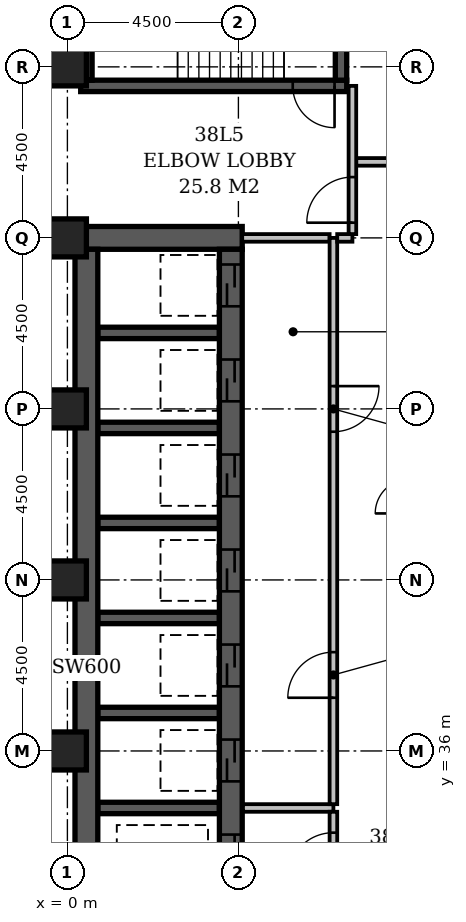
"""IFC4 building model, lengths in metres.
Left out: names, types, materials, properties, quantities, classifications, styles, units other than length and angle.
Written with IfcOpenShell. Run it as: python <this file> out.ifc"""

import sys

from ifc_helpers import new_model, si_unit, direction, frame, frame_2d, origin, origin_2d, place, context, subcontext, project, spatial, rectangle, extrude, element, fill, save


model = new_model("IFC4")
c1 = context("Model", 3, precision=1e-05, world=origin(), true_north=direction((0.0, 1.0)))
c2 = subcontext(c1, "Body", "Model", "MODEL_VIEW")
j1 = project(units=[si_unit("LENGTHUNIT", "METRE"), si_unit("PLANEANGLEUNIT", "RADIAN")], contexts=[c1])
p1 = place(None, origin())
s1 = spatial("IfcSite", under=j1, at=p1, CompositionType="ELEMENT")
p2 = place(p1, origin())
s2 = spatial("IfcBuilding", under=s1, at=p2, CompositionType="ELEMENT")
p3 = place(p2, frame((0.0, 0.0, 152.0)))
s3 = spatial("IfcBuildingStorey", under=s2, at=p3, CompositionType="ELEMENT", Elevation=152.0)
p4 = place(p3, frame((0.2, 49.5, -0.3), z_axis=(0.0, 0.0, 1.0), x_axis=(1.0, 0.0, 0.0)))
e1 = element("IfcWall", 1, at=p4, inside=s3, PredefinedType="SHEAR", context=c2, shape_type="SweptSolid", body=[
    extrude(rectangle(XDim=4.4, YDim=0.6, at=frame_2d((2.2, 0.0))), origin(), (0.0, 0.0, 1.0), 3.6),
])
p5 = place(p3, frame((0.35, 53.5, -0.3), z_axis=(0.0, 0.0, 1.0), x_axis=(1.0, 0.0, 0.0)))
e2 = element("IfcWall", 2, at=p5, inside=s3, PredefinedType="SHEAR", context=c2, shape_type="SweptSolid", body=[
    extrude(rectangle(XDim=7.0, YDim=0.3, at=frame_2d((3.5, 0.0))), origin(), (0.0, 0.0, 1.0), 3.6),
])
p6 = place(p5, frame((5.58, 0.0, 0.3)))
e3 = element("IfcOpeningElement", 3, at=p6, cuts=e2, PredefinedType="OPENING", context=c2, shape_type="SweptSolid", body=[
    extrude(rectangle(XDim=1.1, YDim=2.1, at=frame_2d((0.55, 1.05))), frame((0.0, 0.162, 0.0), z_axis=(0.0, -1.0, 0.0), x_axis=(1.0, 0.0, 0.0)), (0.0, 0.0, 1.0), 0.324),
])
p7 = place(p3, frame((0.5, 27.15, -0.3), z_axis=(0.0, 0.0, 1.0), x_axis=(0.0, 1.0, 0.0)))
e4 = element("IfcWall", 4, at=p7, inside=s3, PredefinedType="SHEAR", context=c2, shape_type="SweptSolid", body=[
    extrude(rectangle(XDim=22.05, YDim=0.6, at=frame_2d((11.025, 0.0))), origin(), (0.0, 0.0, 1.0), 3.6),
])
p8 = place(p3, frame((0.5, 53.65, -0.3), z_axis=(0.0, 0.0, 1.0), x_axis=(0.0, 1.0, 0.0)))
e5 = element("IfcWall", 5, at=p8, inside=s3, PredefinedType="SHEAR", context=c2, shape_type="SweptSolid", body=[
    extrude(rectangle(XDim=4.2, YDim=0.3, at=frame_2d((2.1, 0.0))), origin(), (0.0, 0.0, 1.0), 3.6),
])
for number, where, z_axis, x_axis in (
    (6, (0.8, 34.5, -0.3), (0.0, 0.0, 1.0), (1.0, 0.0, 0.0)),
    (7, (0.8, 37.0, -0.3), (0.0, 0.0, 1.0), (1.0, 0.0, 0.0)),
    (8, (0.8, 39.5, -0.3), (0.0, 0.0, 1.0), (1.0, 0.0, 0.0)),
    (9, (0.8, 42.0, -0.3), (0.0, 0.0, 1.0), (1.0, 0.0, 0.0)),
    (10, (0.8, 44.5, -0.3), (0.0, 0.0, 1.0), (1.0, 0.0, 0.0)),
    (11, (0.8, 47.0, -0.3), (0.0, 0.0, 1.0), (1.0, 0.0, 0.0)),
):
    element("IfcWall", number, at=place(p3, frame(where, z_axis=z_axis, x_axis=x_axis)), inside=s3, PredefinedType="SHEAR", context=c2, shape_type="SweptSolid", body=[
        extrude(rectangle(XDim=3.2, YDim=0.3, at=frame_2d((1.6, 0.0))), origin(), (0.0, 0.0, 1.0), 3.6),
    ])
p9 = place(p3, frame((4.3, 27.15, -0.3), z_axis=(0.0, 0.0, 1.0), x_axis=(0.0, 1.0, 0.0)))
e12 = element("IfcWall", 12, at=p9, inside=s3, PredefinedType="SHEAR", context=c2, shape_type="SweptSolid", body=[
    extrude(rectangle(XDim=22.05, YDim=0.6, at=frame_2d((11.025, 0.0))), origin(), (0.0, 0.0, 1.0), 3.6),
])
p10 = place(p9, frame((3.05, 0.0, 0.3)))
e13 = element("IfcOpeningElement", 13, at=p10, cuts=e12, PredefinedType="OPENING", context=c2, shape_type="SweptSolid", body=[
    extrude(rectangle(XDim=1.1, YDim=2.1, at=frame_2d((0.55, 1.05))), frame((0.0, 0.312, 0.0), z_axis=(0.0, -1.0, 0.0), x_axis=(1.0, 0.0, 0.0)), (0.0, 0.0, 1.0), 0.624),
])
p11 = place(p9, frame((0.55, 0.0, 0.3)))
e14 = element("IfcOpeningElement", 14, at=p11, cuts=e12, PredefinedType="OPENING", context=c2, shape_type="SweptSolid", body=[
    extrude(rectangle(XDim=1.1, YDim=2.1, at=frame_2d((0.55, 1.05))), frame((0.0, 0.312, 0.0), z_axis=(0.0, -1.0, 0.0), x_axis=(1.0, 0.0, 0.0)), (0.0, 0.0, 1.0), 0.624),
])
p12 = place(p9, frame((20.55, 0.0, 0.3)))
e15 = element("IfcOpeningElement", 15, at=p12, cuts=e12, PredefinedType="OPENING", context=c2, shape_type="SweptSolid", body=[
    extrude(rectangle(XDim=1.1, YDim=2.1, at=frame_2d((0.55, 1.05))), frame((0.0, 0.312, 0.0), z_axis=(0.0, -1.0, 0.0), x_axis=(1.0, 0.0, 0.0)), (0.0, 0.0, 1.0), 0.624),
])
p13 = place(p9, frame((18.05, 0.0, 0.3)))
e16 = element("IfcOpeningElement", 16, at=p13, cuts=e12, PredefinedType="OPENING", context=c2, shape_type="SweptSolid", body=[
    extrude(rectangle(XDim=1.1, YDim=2.1, at=frame_2d((0.55, 1.05))), frame((0.0, 0.312, 0.0), z_axis=(0.0, -1.0, 0.0), x_axis=(1.0, 0.0, 0.0)), (0.0, 0.0, 1.0), 0.624),
])
p14 = place(p9, frame((15.55, 0.0, 0.3)))
e17 = element("IfcOpeningElement", 17, at=p14, cuts=e12, PredefinedType="OPENING", context=c2, shape_type="SweptSolid", body=[
    extrude(rectangle(XDim=1.1, YDim=2.1, at=frame_2d((0.55, 1.05))), frame((0.0, 0.312, 0.0), z_axis=(0.0, -1.0, 0.0), x_axis=(1.0, 0.0, 0.0)), (0.0, 0.0, 1.0), 0.624),
])
p15 = place(p9, frame((13.05, 0.0, 0.3)))
e18 = element("IfcOpeningElement", 18, at=p15, cuts=e12, PredefinedType="OPENING", context=c2, shape_type="SweptSolid", body=[
    extrude(rectangle(XDim=1.1, YDim=2.1, at=frame_2d((0.55, 1.05))), frame((0.0, 0.312, 0.0), z_axis=(0.0, -1.0, 0.0), x_axis=(1.0, 0.0, 0.0)), (0.0, 0.0, 1.0), 0.624),
])
p16 = place(p9, frame((10.55, 0.0, 0.3)))
e19 = element("IfcOpeningElement", 19, at=p16, cuts=e12, PredefinedType="OPENING", context=c2, shape_type="SweptSolid", body=[
    extrude(rectangle(XDim=1.1, YDim=2.1, at=frame_2d((0.55, 1.05))), frame((0.0, 0.312, 0.0), z_axis=(0.0, -1.0, 0.0), x_axis=(1.0, 0.0, 0.0)), (0.0, 0.0, 1.0), 0.624),
])
p17 = place(p9, frame((8.05, 0.0, 0.3)))
e20 = element("IfcOpeningElement", 20, at=p17, cuts=e12, PredefinedType="OPENING", context=c2, shape_type="SweptSolid", body=[
    extrude(rectangle(XDim=1.1, YDim=2.1, at=frame_2d((0.55, 1.05))), frame((0.0, 0.312, 0.0), z_axis=(0.0, -1.0, 0.0), x_axis=(1.0, 0.0, 0.0)), (0.0, 0.0, 1.0), 0.624),
])
p18 = place(p9, frame((5.55, 0.0, 0.3)))
e21 = element("IfcOpeningElement", 21, at=p18, cuts=e12, PredefinedType="OPENING", context=c2, shape_type="SweptSolid", body=[
    extrude(rectangle(XDim=1.1, YDim=2.1, at=frame_2d((0.55, 1.05))), frame((0.0, 0.312, 0.0), z_axis=(0.0, -1.0, 0.0), x_axis=(1.0, 0.0, 0.0)), (0.0, 0.0, 1.0), 0.624),
])
p19 = place(p3, frame((7.2, 53.65, -0.3), z_axis=(0.0, 0.0, 1.0), x_axis=(0.0, 1.0, 0.0)))
e22 = element("IfcWall", 22, at=p19, inside=s3, PredefinedType="SHEAR", context=c2, shape_type="SweptSolid", body=[
    extrude(rectangle(XDim=4.2, YDim=0.3, at=frame_2d((2.1, 0.0))), origin(), (0.0, 0.0, 1.0), 3.6),
])
for number, where, z_axis, x_axis in (
    (23, (0.0, 36.0, -0.3), (0.0, 0.0, 1.0), (1.0, 0.0, 0.0)),
    (24, (0.0, 40.5, -0.3), (0.0, 0.0, 1.0), (1.0, 0.0, 0.0)),
    (25, (0.0, 45.0, -0.3), (0.0, 0.0, 1.0), (1.0, 0.0, 0.0)),
    (26, (0.0, 49.5, -0.3), (0.0, 0.0, 1.0), (1.0, 0.0, 0.0)),
    (27, (0.0, 54.0, -0.3), (0.0, 0.0, 1.0), (1.0, 0.0, 0.0)),
):
    element("IfcColumn", number, at=place(p3, frame(where, z_axis=z_axis, x_axis=x_axis)), inside=s3, PredefinedType="COLUMN", context=c2, shape_type="SweptSolid", body=[
        extrude(rectangle(XDim=1.0, YDim=1.0, at=origin_2d()), origin(), (0.0, 0.0, 1.0), 3.6),
    ])
p20 = place(p3, frame((4.62, 34.5, 0.0), z_axis=(0.0, 0.0, 1.0), x_axis=(1.0, 0.0, 0.0)))
e28 = element("IfcWall", 28, at=p20, inside=s3, PredefinedType="PARTITIONING", context=c2, shape_type="SweptSolid", body=[
    extrude(rectangle(XDim=2.38, YDim=0.2, at=frame_2d((1.19, 0.0))), origin(), (0.0, 0.0, 1.0), 3.3),
])
p21 = place(p3, frame((7.0, 34.6, 0.0), z_axis=(0.0, 0.0, 1.0), x_axis=(0.0, 1.0, 0.0)))
e29 = element("IfcWall", 29, at=p21, inside=s3, PredefinedType="PARTITIONING", context=c2, shape_type="SweptSolid", body=[
    extrude(rectangle(XDim=14.9, YDim=0.2, at=frame_2d((7.45, 0.0))), origin(), (0.0, 0.0, 1.0), 3.3),
])
p22 = place(p21, frame((2.8, 0.0, 0.0)))
e30 = element("IfcOpeningElement", 30, at=p22, cuts=e29, PredefinedType="OPENING", context=c2, shape_type="SweptSolid", body=[
    extrude(rectangle(XDim=1.2, YDim=2.1, at=frame_2d((0.6, 1.05))), frame((0.0, 0.112, 0.0), z_axis=(0.0, -1.0, 0.0), x_axis=(1.0, 0.0, 0.0)), (0.0, 0.0, 1.0), 0.224),
])
p23 = place(p21, frame((9.8, 0.0, 0.0)))
e31 = element("IfcOpeningElement", 31, at=p23, cuts=e29, PredefinedType="OPENING", context=c2, shape_type="SweptSolid", body=[
    extrude(rectangle(XDim=1.2, YDim=2.1, at=frame_2d((0.6, 1.05))), frame((0.0, 0.112, 0.0), z_axis=(0.0, -1.0, 0.0), x_axis=(1.0, 0.0, 0.0)), (0.0, 0.0, 1.0), 0.224),
])
p24 = place(p3, frame((4.6, 49.5, 0.0), z_axis=(0.0, 0.0, 1.0), x_axis=(1.0, 0.0, 0.0)))
e32 = element("IfcWall", 32, at=p24, inside=s3, PredefinedType="PARTITIONING", context=c2, shape_type="SweptSolid", body=[
    extrude(rectangle(XDim=2.3, YDim=0.2, at=frame_2d((1.15, 0.0))), origin(), (0.0, 0.0, 1.0), 3.3),
])
p25 = place(p3, frame((7.0, 32.1, 0.0), z_axis=(0.0, 0.0, 1.0), x_axis=(0.0, 1.0, 0.0)))
e33 = element("IfcWall", 33, at=p25, inside=s3, PredefinedType="PARTITIONING", context=c2, shape_type="SweptSolid", body=[
    extrude(rectangle(XDim=2.3, YDim=0.2, at=frame_2d((1.15, 0.0))), origin(), (0.0, 0.0, 1.0), 3.3),
])
p26 = place(p25, frame((0.55, 0.0, 0.0)))
e34 = element("IfcOpeningElement", 34, at=p26, cuts=e33, PredefinedType="OPENING", context=c2, shape_type="SweptSolid", body=[
    extrude(rectangle(XDim=1.2, YDim=2.1, at=frame_2d((0.6, 1.05))), frame((0.0, 0.112, 0.0), z_axis=(0.0, -1.0, 0.0), x_axis=(1.0, 0.0, 0.0)), (0.0, 0.0, 1.0), 0.224),
])
p27 = place(p3, frame((7.1, 49.5, 0.0), z_axis=(0.0, 0.0, 1.0), x_axis=(1.0, 0.0, 0.0)))
e35 = element("IfcWall", 35, at=p27, inside=s3, PredefinedType="PARTITIONING", context=c2, shape_type="SweptSolid", body=[
    extrude(rectangle(XDim=0.4, YDim=0.2, at=frame_2d((0.2, 0.0))), origin(), (0.0, 0.0, 1.0), 3.3),
])
p28 = place(p3, frame((7.5, 49.6, 0.0), z_axis=(0.0, 0.0, 1.0), x_axis=(0.0, 1.0, 0.0)))
e36 = element("IfcWall", 36, at=p28, inside=s3, PredefinedType="PARTITIONING", context=c2, shape_type="SweptSolid", body=[
    extrude(rectangle(XDim=3.9, YDim=0.2, at=frame_2d((1.95, 0.0))), origin(), (0.0, 0.0, 1.0), 3.3),
])
p29 = place(p28, frame((0.3, 0.0, 0.0)))
e37 = element("IfcOpeningElement", 37, at=p29, cuts=e36, PredefinedType="OPENING", context=c2, shape_type="SweptSolid", body=[
    extrude(rectangle(XDim=1.2, YDim=2.1, at=frame_2d((0.6, 1.05))), frame((0.0, 0.112, 0.0), z_axis=(0.0, -1.0, 0.0), x_axis=(1.0, 0.0, 0.0)), (0.0, 0.0, 1.0), 0.224),
])
p30 = place(p3, frame((7.6, 51.5, 0.0), z_axis=(0.0, 0.0, 1.0), x_axis=(1.0, 0.0, 0.0)))
e38 = element("IfcWall", 38, at=p30, inside=s3, PredefinedType="PARTITIONING", context=c2, shape_type="SweptSolid", body=[
    extrude(rectangle(XDim=15.3, YDim=0.2, at=frame_2d((7.65, 0.0))), origin(), (0.0, 0.0, 1.0), 3.3),
])
p31 = place(p30, frame((3.55, 0.0, 0.0)))
e39 = element("IfcOpeningElement", 39, at=p31, cuts=e38, PredefinedType="OPENING", context=c2, shape_type="SweptSolid", body=[
    extrude(rectangle(XDim=0.9, YDim=2.1, at=frame_2d((0.45, 1.05))), frame((0.0, 0.112, 0.0), z_axis=(0.0, -1.0, 0.0), x_axis=(1.0, 0.0, 0.0)), (0.0, 0.0, 1.0), 0.224),
])
p32 = place(p30, frame((11.3, 0.0, 0.0)))
e40 = element("IfcOpeningElement", 40, at=p32, cuts=e38, PredefinedType="OPENING", context=c2, shape_type="SweptSolid", body=[
    extrude(rectangle(XDim=0.9, YDim=2.1, at=frame_2d((0.45, 1.05))), frame((0.0, 0.112, 0.0), z_axis=(0.0, -1.0, 0.0), x_axis=(1.0, 0.0, 0.0)), (0.0, 0.0, 1.0), 0.224),
])
p33 = place(p29, origin())
e41 = element("IfcDoor", 41, at=p33, inside=s3, OperationType="SINGLE_SWING_LEFT", PredefinedType="DOOR", context=c2, shape_type="SweptSolid", body=[
    extrude(rectangle(XDim=1.2, YDim=2.1, at=frame_2d((0.6, 1.05))), frame((0.0, 0.025, 0.0), z_axis=(0.0, -1.0, 0.0), x_axis=(1.0, 0.0, 0.0)), (0.0, 0.0, 1.0), 0.05),
])
fill(e37, e41)
p34 = place(p12, origin())
e42 = element("IfcDoor", 42, at=p34, inside=s3, OperationType="SLIDING_TO_LEFT", PredefinedType="DOOR", context=c2, shape_type="SweptSolid", body=[
    extrude(rectangle(XDim=1.1, YDim=2.1, at=frame_2d((0.55, 1.05))), frame((0.0, 0.025, 0.0), z_axis=(0.0, -1.0, 0.0), x_axis=(1.0, 0.0, 0.0)), (0.0, 0.0, 1.0), 0.05),
])
fill(e15, e42)
p35 = place(p13, origin())
e43 = element("IfcDoor", 43, at=p35, inside=s3, OperationType="SLIDING_TO_LEFT", PredefinedType="DOOR", context=c2, shape_type="SweptSolid", body=[
    extrude(rectangle(XDim=1.1, YDim=2.1, at=frame_2d((0.55, 1.05))), frame((0.0, 0.025, 0.0), z_axis=(0.0, -1.0, 0.0), x_axis=(1.0, 0.0, 0.0)), (0.0, 0.0, 1.0), 0.05),
])
fill(e16, e43)
p36 = place(p14, origin())
e44 = element("IfcDoor", 44, at=p36, inside=s3, OperationType="SLIDING_TO_LEFT", PredefinedType="DOOR", context=c2, shape_type="SweptSolid", body=[
    extrude(rectangle(XDim=1.1, YDim=2.1, at=frame_2d((0.55, 1.05))), frame((0.0, 0.025, 0.0), z_axis=(0.0, -1.0, 0.0), x_axis=(1.0, 0.0, 0.0)), (0.0, 0.0, 1.0), 0.05),
])
fill(e17, e44)
p37 = place(p15, origin())
e45 = element("IfcDoor", 45, at=p37, inside=s3, OperationType="SLIDING_TO_LEFT", PredefinedType="DOOR", context=c2, shape_type="SweptSolid", body=[
    extrude(rectangle(XDim=1.1, YDim=2.1, at=frame_2d((0.55, 1.05))), frame((0.0, 0.025, 0.0), z_axis=(0.0, -1.0, 0.0), x_axis=(1.0, 0.0, 0.0)), (0.0, 0.0, 1.0), 0.05),
])
fill(e18, e45)
p38 = place(p16, origin())
e46 = element("IfcDoor", 46, at=p38, inside=s3, OperationType="SLIDING_TO_LEFT", PredefinedType="DOOR", context=c2, shape_type="SweptSolid", body=[
    extrude(rectangle(XDim=1.1, YDim=2.1, at=frame_2d((0.55, 1.05))), frame((0.0, 0.025, 0.0), z_axis=(0.0, -1.0, 0.0), x_axis=(1.0, 0.0, 0.0)), (0.0, 0.0, 1.0), 0.05),
])
fill(e19, e46)
p39 = place(p17, origin())
e47 = element("IfcDoor", 47, at=p39, inside=s3, OperationType="SLIDING_TO_LEFT", PredefinedType="DOOR", context=c2, shape_type="SweptSolid", body=[
    extrude(rectangle(XDim=1.1, YDim=2.1, at=frame_2d((0.55, 1.05))), frame((0.0, 0.025, 0.0), z_axis=(0.0, -1.0, 0.0), x_axis=(1.0, 0.0, 0.0)), (0.0, 0.0, 1.0), 0.05),
])
fill(e20, e47)
p40 = place(p22, origin())
e48 = element("IfcDoor", 48, at=p40, inside=s3, OperationType="SINGLE_SWING_LEFT", PredefinedType="DOOR", context=c2, shape_type="SweptSolid", body=[
    extrude(rectangle(XDim=1.2, YDim=2.1, at=frame_2d((0.6, 1.05))), frame((0.0, 0.025, 0.0), z_axis=(0.0, -1.0, 0.0), x_axis=(1.0, 0.0, 0.0)), (0.0, 0.0, 1.0), 0.05),
])
fill(e30, e48)
p41 = place(p23, origin())
e49 = element("IfcDoor", 49, at=p41, inside=s3, OperationType="SINGLE_SWING_RIGHT", PredefinedType="DOOR", context=c2, shape_type="SweptSolid", body=[
    extrude(rectangle(XDim=1.2, YDim=2.1, at=frame_2d((0.6, 1.05))), frame((0.0, 0.025, 0.0), z_axis=(0.0, -1.0, 0.0), x_axis=(1.0, 0.0, 0.0)), (0.0, 0.0, 1.0), 0.05),
])
fill(e31, e49)
p42 = place(p26, origin())
e50 = element("IfcDoor", 50, at=p42, inside=s3, OperationType="SINGLE_SWING_LEFT", PredefinedType="DOOR", context=c2, shape_type="SweptSolid", body=[
    extrude(rectangle(XDim=1.2, YDim=2.1, at=frame_2d((0.6, 1.05))), frame((0.0, 0.025, 0.0), z_axis=(0.0, -1.0, 0.0), x_axis=(1.0, 0.0, 0.0)), (0.0, 0.0, 1.0), 0.05),
])
fill(e34, e50)
p43 = place(p18, origin())
e51 = element("IfcDoor", 51, at=p43, inside=s3, OperationType="SLIDING_TO_LEFT", PredefinedType="DOOR", context=c2, shape_type="SweptSolid", body=[
    extrude(rectangle(XDim=1.1, YDim=2.1, at=frame_2d((0.55, 1.05))), frame((0.0, 0.025, 0.0), z_axis=(0.0, -1.0, 0.0), x_axis=(1.0, 0.0, 0.0)), (0.0, 0.0, 1.0), 0.05),
])
fill(e21, e51)
p44 = place(p6, origin())
e52 = element("IfcDoor", 52, at=p44, inside=s3, OperationType="SINGLE_SWING_RIGHT", PredefinedType="DOOR", context=c2, shape_type="SweptSolid", body=[
    extrude(rectangle(XDim=1.1, YDim=2.1, at=frame_2d((0.55, 1.05))), frame((0.0, 0.025, 0.0), z_axis=(0.0, -1.0, 0.0), x_axis=(1.0, 0.0, 0.0)), (0.0, 0.0, 1.0), 0.05),
])
fill(e3, e52)
save(model, sys.argv[1])
